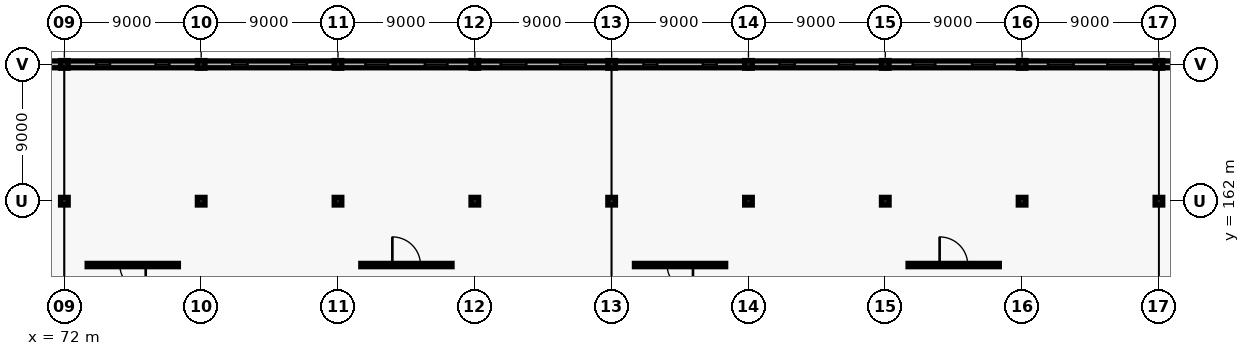
"""IFC4 building model, lengths in metres.
Left out: names, types, materials, properties, quantities, classifications, styles, units other than length and angle.
Written with IfcOpenShell. Run it as: python <this file> out.ifc"""

import sys

from ifc_helpers import new_model, si_unit, direction, frame, frame_2d, origin, origin_2d, place, context, subcontext, project, spatial, rectangle, extrude, element, fill, save


model = new_model("IFC4")
c1 = context("Model", 3, precision=1e-05, world=origin(), true_north=direction((0.0, 1.0)))
c2 = subcontext(c1, "Body", "Model", "MODEL_VIEW")
j1 = project(units=[si_unit("LENGTHUNIT", "METRE"), si_unit("PLANEANGLEUNIT", "RADIAN")], contexts=[c1])
p1 = place(None, origin())
s1 = spatial("IfcSite", under=j1, at=p1, CompositionType="ELEMENT")
p2 = place(p1, origin())
s2 = spatial("IfcBuilding", under=s1, at=p2, CompositionType="ELEMENT")
p3 = place(p2, frame((0.0, 0.0, 9.6)))
s3 = spatial("IfcBuildingStorey", under=s2, at=p3, CompositionType="ELEMENT", Elevation=9.6)
for number, where, z_axis, x_axis in (
    (1, (72.0, 162.0, 0.0), (0.0, 0.0, 1.0), (1.0, 0.0, 0.0)),
    (2, (72.0, 171.0, 0.0), (0.0, 0.0, 1.0), (1.0, 0.0, 0.0)),
    (3, (81.0, 162.0, 0.0), (0.0, 0.0, 1.0), (1.0, 0.0, 0.0)),
    (4, (81.0, 171.0, 0.0), (0.0, 0.0, 1.0), (1.0, 0.0, 0.0)),
    (5, (90.0, 162.0, 0.0), (0.0, 0.0, 1.0), (1.0, 0.0, 0.0)),
    (6, (90.0, 171.0, 0.0), (0.0, 0.0, 1.0), (1.0, 0.0, 0.0)),
    (7, (99.0, 162.0, 0.0), (0.0, 0.0, 1.0), (1.0, 0.0, 0.0)),
    (8, (99.0, 171.0, 0.0), (0.0, 0.0, 1.0), (1.0, 0.0, 0.0)),
    (9, (108.0, 162.0, 0.0), (0.0, 0.0, 1.0), (1.0, 0.0, 0.0)),
    (10, (108.0, 171.0, 0.0), (0.0, 0.0, 1.0), (1.0, 0.0, 0.0)),
    (11, (117.0, 162.0, 0.0), (0.0, 0.0, 1.0), (1.0, 0.0, 0.0)),
    (12, (117.0, 171.0, 0.0), (0.0, 0.0, 1.0), (1.0, 0.0, 0.0)),
    (13, (126.0, 162.0, 0.0), (0.0, 0.0, 1.0), (1.0, 0.0, 0.0)),
    (14, (126.0, 171.0, 0.0), (0.0, 0.0, 1.0), (1.0, 0.0, 0.0)),
    (15, (135.0, 162.0, 0.0), (0.0, 0.0, 1.0), (1.0, 0.0, 0.0)),
    (16, (135.0, 171.0, 0.0), (0.0, 0.0, 1.0), (1.0, 0.0, 0.0)),
    (17, (144.0, 162.0, 0.0), (0.0, 0.0, 1.0), (1.0, 0.0, 0.0)),
    (18, (144.0, 171.0, 0.0), (0.0, 0.0, 1.0), (1.0, 0.0, 0.0)),
):
    element("IfcColumn", number, at=place(p3, frame(where, z_axis=z_axis, x_axis=x_axis)), inside=s3, PredefinedType="COLUMN", context=c2, shape_type="SweptSolid", body=[
        extrude(rectangle(XDim=0.5, YDim=0.5, at=origin_2d()), origin(), (0.0, 0.0, 1.0), 3.9),
    ])
p4 = place(p3, frame((63.06, 171.0, 0.0), z_axis=(0.0, 0.0, 1.0), x_axis=(1.0, 0.0, 0.0)))
e19 = element("IfcWall", 19, at=p4, inside=s3, PredefinedType="SOLIDWALL", context=c2, shape_type="SweptSolid", body=[
    extrude(rectangle(XDim=8.88, YDim=0.45, at=frame_2d((4.44, 0.0))), origin(), (0.0, 0.0, 1.0), 3.15),
])
p5 = place(p4, frame((1.646, 0.0, 0.9)))
e20 = element("IfcOpeningElement", 20, at=p5, cuts=e19, PredefinedType="OPENING", context=c2, shape_type="SweptSolid", body=[
    extrude(rectangle(XDim=1.68, YDim=1.85, at=frame_2d((0.84, 0.925))), frame((0.0, 0.235, 0.0), z_axis=(0.0, -1.0, 0.0), x_axis=(1.0, 0.0, 0.0)), (0.0, 0.0, 1.0), 0.47),
])
p6 = place(p4, frame((5.554, 0.0, 0.9)))
e21 = element("IfcOpeningElement", 21, at=p6, cuts=e19, PredefinedType="OPENING", context=c2, shape_type="SweptSolid", body=[
    extrude(rectangle(XDim=1.68, YDim=1.85, at=frame_2d((0.84, 0.925))), frame((0.0, 0.235, 0.0), z_axis=(0.0, -1.0, 0.0), x_axis=(1.0, 0.0, 0.0)), (0.0, 0.0, 1.0), 0.47),
])
p7 = place(p3, frame((72.06, 171.0, 0.0), z_axis=(0.0, 0.0, 1.0), x_axis=(1.0, 0.0, 0.0)))
e22 = element("IfcWall", 22, at=p7, inside=s3, PredefinedType="SOLIDWALL", context=c2, shape_type="SweptSolid", body=[
    extrude(rectangle(XDim=8.88, YDim=0.45, at=frame_2d((4.44, 0.0))), origin(), (0.0, 0.0, 1.0), 3.15),
])
p8 = place(p7, frame((2.036, 0.0, 0.9)))
e23 = element("IfcOpeningElement", 23, at=p8, cuts=e22, PredefinedType="OPENING", context=c2, shape_type="SweptSolid", body=[
    extrude(rectangle(XDim=0.9, YDim=1.2, at=frame_2d((0.45, 0.6))), frame((0.0, 0.235, 0.0), z_axis=(0.0, -1.0, 0.0), x_axis=(1.0, 0.0, 0.0)), (0.0, 0.0, 1.0), 0.47),
])
p9 = place(p7, frame((5.944, 0.0, 0.9)))
e24 = element("IfcOpeningElement", 24, at=p9, cuts=e22, PredefinedType="OPENING", context=c2, shape_type="SweptSolid", body=[
    extrude(rectangle(XDim=0.9, YDim=1.2, at=frame_2d((0.45, 0.6))), frame((0.0, 0.235, 0.0), z_axis=(0.0, -1.0, 0.0), x_axis=(1.0, 0.0, 0.0)), (0.0, 0.0, 1.0), 0.47),
])
p10 = place(p3, frame((81.06, 171.0, 0.0), z_axis=(0.0, 0.0, 1.0), x_axis=(1.0, 0.0, 0.0)))
e25 = element("IfcWall", 25, at=p10, inside=s3, PredefinedType="SOLIDWALL", context=c2, shape_type="SweptSolid", body=[
    extrude(rectangle(XDim=8.88, YDim=0.45, at=frame_2d((4.44, 0.0))), origin(), (0.0, 0.0, 1.0), 3.15),
])
p11 = place(p10, frame((1.986, 0.0, 0.9)))
e26 = element("IfcOpeningElement", 26, at=p11, cuts=e25, PredefinedType="OPENING", context=c2, shape_type="SweptSolid", body=[
    extrude(rectangle(XDim=1.0, YDim=1.5, at=frame_2d((0.5, 0.75))), frame((0.0, 0.235, 0.0), z_axis=(0.0, -1.0, 0.0), x_axis=(1.0, 0.0, 0.0)), (0.0, 0.0, 1.0), 0.47),
])
p12 = place(p10, frame((5.894, 0.0, 0.9)))
e27 = element("IfcOpeningElement", 27, at=p12, cuts=e25, PredefinedType="OPENING", context=c2, shape_type="SweptSolid", body=[
    extrude(rectangle(XDim=1.0, YDim=1.5, at=frame_2d((0.5, 0.75))), frame((0.0, 0.235, 0.0), z_axis=(0.0, -1.0, 0.0), x_axis=(1.0, 0.0, 0.0)), (0.0, 0.0, 1.0), 0.47),
])
p13 = place(p3, frame((90.06, 171.0, 0.0), z_axis=(0.0, 0.0, 1.0), x_axis=(1.0, 0.0, 0.0)))
e28 = element("IfcWall", 28, at=p13, inside=s3, PredefinedType="SOLIDWALL", context=c2, shape_type="SweptSolid", body=[
    extrude(rectangle(XDim=8.88, YDim=0.45, at=frame_2d((4.44, 0.0))), origin(), (0.0, 0.0, 1.0), 3.15),
])
p14 = place(p13, frame((1.746, 0.0, 0.9)))
e29 = element("IfcOpeningElement", 29, at=p14, cuts=e28, PredefinedType="OPENING", context=c2, shape_type="SweptSolid", body=[
    extrude(rectangle(XDim=1.48, YDim=1.75, at=frame_2d((0.74, 0.875))), frame((0.0, 0.235, 0.0), z_axis=(0.0, -1.0, 0.0), x_axis=(1.0, 0.0, 0.0)), (0.0, 0.0, 1.0), 0.47),
])
p15 = place(p13, frame((5.654, 0.0, 0.9)))
e30 = element("IfcOpeningElement", 30, at=p15, cuts=e28, PredefinedType="OPENING", context=c2, shape_type="SweptSolid", body=[
    extrude(rectangle(XDim=1.48, YDim=1.75, at=frame_2d((0.74, 0.875))), frame((0.0, 0.235, 0.0), z_axis=(0.0, -1.0, 0.0), x_axis=(1.0, 0.0, 0.0)), (0.0, 0.0, 1.0), 0.47),
])
p16 = place(p3, frame((99.06, 171.0, 0.0), z_axis=(0.0, 0.0, 1.0), x_axis=(1.0, 0.0, 0.0)))
e31 = element("IfcWall", 31, at=p16, inside=s3, PredefinedType="SOLIDWALL", context=c2, shape_type="SweptSolid", body=[
    extrude(rectangle(XDim=8.88, YDim=0.45, at=frame_2d((4.44, 0.0))), origin(), (0.0, 0.0, 1.0), 3.15),
])
p17 = place(p16, frame((1.646, 0.0, 0.9)))
e32 = element("IfcOpeningElement", 32, at=p17, cuts=e31, PredefinedType="OPENING", context=c2, shape_type="SweptSolid", body=[
    extrude(rectangle(XDim=1.68, YDim=1.85, at=frame_2d((0.84, 0.925))), frame((0.0, 0.235, 0.0), z_axis=(0.0, -1.0, 0.0), x_axis=(1.0, 0.0, 0.0)), (0.0, 0.0, 1.0), 0.47),
])
p18 = place(p16, frame((5.554, 0.0, 0.9)))
e33 = element("IfcOpeningElement", 33, at=p18, cuts=e31, PredefinedType="OPENING", context=c2, shape_type="SweptSolid", body=[
    extrude(rectangle(XDim=1.68, YDim=1.85, at=frame_2d((0.84, 0.925))), frame((0.0, 0.235, 0.0), z_axis=(0.0, -1.0, 0.0), x_axis=(1.0, 0.0, 0.0)), (0.0, 0.0, 1.0), 0.47),
])
p19 = place(p3, frame((108.06, 171.0, 0.0), z_axis=(0.0, 0.0, 1.0), x_axis=(1.0, 0.0, 0.0)))
e34 = element("IfcWall", 34, at=p19, inside=s3, PredefinedType="SOLIDWALL", context=c2, shape_type="SweptSolid", body=[
    extrude(rectangle(XDim=8.88, YDim=0.45, at=frame_2d((4.44, 0.0))), origin(), (0.0, 0.0, 1.0), 3.15),
])
p20 = place(p19, frame((2.036, 0.0, 0.9)))
e35 = element("IfcOpeningElement", 35, at=p20, cuts=e34, PredefinedType="OPENING", context=c2, shape_type="SweptSolid", body=[
    extrude(rectangle(XDim=0.9, YDim=1.2, at=frame_2d((0.45, 0.6))), frame((0.0, 0.235, 0.0), z_axis=(0.0, -1.0, 0.0), x_axis=(1.0, 0.0, 0.0)), (0.0, 0.0, 1.0), 0.47),
])
p21 = place(p19, frame((5.944, 0.0, 0.9)))
e36 = element("IfcOpeningElement", 36, at=p21, cuts=e34, PredefinedType="OPENING", context=c2, shape_type="SweptSolid", body=[
    extrude(rectangle(XDim=0.9, YDim=1.2, at=frame_2d((0.45, 0.6))), frame((0.0, 0.235, 0.0), z_axis=(0.0, -1.0, 0.0), x_axis=(1.0, 0.0, 0.0)), (0.0, 0.0, 1.0), 0.47),
])
p22 = place(p3, frame((117.06, 171.0, 0.0), z_axis=(0.0, 0.0, 1.0), x_axis=(1.0, 0.0, 0.0)))
e37 = element("IfcWall", 37, at=p22, inside=s3, PredefinedType="SOLIDWALL", context=c2, shape_type="SweptSolid", body=[
    extrude(rectangle(XDim=8.88, YDim=0.45, at=frame_2d((4.44, 0.0))), origin(), (0.0, 0.0, 1.0), 3.15),
])
p23 = place(p22, frame((1.986, 0.0, 0.9)))
e38 = element("IfcOpeningElement", 38, at=p23, cuts=e37, PredefinedType="OPENING", context=c2, shape_type="SweptSolid", body=[
    extrude(rectangle(XDim=1.0, YDim=1.5, at=frame_2d((0.5, 0.75))), frame((0.0, 0.235, 0.0), z_axis=(0.0, -1.0, 0.0), x_axis=(1.0, 0.0, 0.0)), (0.0, 0.0, 1.0), 0.47),
])
p24 = place(p22, frame((5.894, 0.0, 0.9)))
e39 = element("IfcOpeningElement", 39, at=p24, cuts=e37, PredefinedType="OPENING", context=c2, shape_type="SweptSolid", body=[
    extrude(rectangle(XDim=1.0, YDim=1.5, at=frame_2d((0.5, 0.75))), frame((0.0, 0.235, 0.0), z_axis=(0.0, -1.0, 0.0), x_axis=(1.0, 0.0, 0.0)), (0.0, 0.0, 1.0), 0.47),
])
p25 = place(p3, frame((126.06, 171.0, 0.0), z_axis=(0.0, 0.0, 1.0), x_axis=(1.0, 0.0, 0.0)))
e40 = element("IfcWall", 40, at=p25, inside=s3, PredefinedType="SOLIDWALL", context=c2, shape_type="SweptSolid", body=[
    extrude(rectangle(XDim=8.88, YDim=0.45, at=frame_2d((4.44, 0.0))), origin(), (0.0, 0.0, 1.0), 3.15),
])
p26 = place(p25, frame((1.746, 0.0, 0.9)))
e41 = element("IfcOpeningElement", 41, at=p26, cuts=e40, PredefinedType="OPENING", context=c2, shape_type="SweptSolid", body=[
    extrude(rectangle(XDim=1.48, YDim=1.75, at=frame_2d((0.74, 0.875))), frame((0.0, 0.235, 0.0), z_axis=(0.0, -1.0, 0.0), x_axis=(1.0, 0.0, 0.0)), (0.0, 0.0, 1.0), 0.47),
])
p27 = place(p25, frame((5.654, 0.0, 0.9)))
e42 = element("IfcOpeningElement", 42, at=p27, cuts=e40, PredefinedType="OPENING", context=c2, shape_type="SweptSolid", body=[
    extrude(rectangle(XDim=1.48, YDim=1.75, at=frame_2d((0.74, 0.875))), frame((0.0, 0.235, 0.0), z_axis=(0.0, -1.0, 0.0), x_axis=(1.0, 0.0, 0.0)), (0.0, 0.0, 1.0), 0.47),
])
p28 = place(p3, frame((135.06, 171.0, 0.0), z_axis=(0.0, 0.0, 1.0), x_axis=(1.0, 0.0, 0.0)))
e43 = element("IfcWall", 43, at=p28, inside=s3, PredefinedType="SOLIDWALL", context=c2, shape_type="SweptSolid", body=[
    extrude(rectangle(XDim=8.88, YDim=0.45, at=frame_2d((4.44, 0.0))), origin(), (0.0, 0.0, 1.0), 3.15),
])
p29 = place(p28, frame((1.646, 0.0, 0.9)))
e44 = element("IfcOpeningElement", 44, at=p29, cuts=e43, PredefinedType="OPENING", context=c2, shape_type="SweptSolid", body=[
    extrude(rectangle(XDim=1.68, YDim=1.85, at=frame_2d((0.84, 0.925))), frame((0.0, 0.235, 0.0), z_axis=(0.0, -1.0, 0.0), x_axis=(1.0, 0.0, 0.0)), (0.0, 0.0, 1.0), 0.47),
])
p30 = place(p28, frame((5.554, 0.0, 0.9)))
e45 = element("IfcOpeningElement", 45, at=p30, cuts=e43, PredefinedType="OPENING", context=c2, shape_type="SweptSolid", body=[
    extrude(rectangle(XDim=1.68, YDim=1.85, at=frame_2d((0.84, 0.925))), frame((0.0, 0.235, 0.0), z_axis=(0.0, -1.0, 0.0), x_axis=(1.0, 0.0, 0.0)), (0.0, 0.0, 1.0), 0.47),
])
p31 = place(p3, frame((144.06, 171.0, 0.0), z_axis=(0.0, 0.0, 1.0), x_axis=(1.0, 0.0, 0.0)))
e46 = element("IfcWall", 46, at=p31, inside=s3, PredefinedType="SOLIDWALL", context=c2, shape_type="SweptSolid", body=[
    extrude(rectangle(XDim=8.88, YDim=0.45, at=frame_2d((4.44, 0.0))), origin(), (0.0, 0.0, 1.0), 3.15),
])
p32 = place(p31, frame((2.036, 0.0, 0.9)))
e47 = element("IfcOpeningElement", 47, at=p32, cuts=e46, PredefinedType="OPENING", context=c2, shape_type="SweptSolid", body=[
    extrude(rectangle(XDim=0.9, YDim=1.2, at=frame_2d((0.45, 0.6))), frame((0.0, 0.235, 0.0), z_axis=(0.0, -1.0, 0.0), x_axis=(1.0, 0.0, 0.0)), (0.0, 0.0, 1.0), 0.47),
])
p33 = place(p31, frame((5.944, 0.0, 0.9)))
e48 = element("IfcOpeningElement", 48, at=p33, cuts=e46, PredefinedType="OPENING", context=c2, shape_type="SweptSolid", body=[
    extrude(rectangle(XDim=0.9, YDim=1.2, at=frame_2d((0.45, 0.6))), frame((0.0, 0.235, 0.0), z_axis=(0.0, -1.0, 0.0), x_axis=(1.0, 0.0, 0.0)), (0.0, 0.0, 1.0), 0.47),
])
p34 = place(p3, frame((73.5, 157.8, 0.0), z_axis=(0.0, 0.0, 1.0), x_axis=(1.0, 0.0, 0.0)))
e49 = element("IfcWall", 49, at=p34, inside=s3, PredefinedType="PARTITIONING", context=c2, shape_type="SweptSolid", body=[
    extrude(rectangle(XDim=6.0, YDim=0.215, at=frame_2d((3.0, 0.0))), origin(), (0.0, 0.0, 1.0), 2.9),
])
p35 = place(p34, frame((2.15, 0.0, 0.0)))
e50 = element("IfcOpeningElement", 50, at=p35, cuts=e49, PredefinedType="OPENING", context=c2, shape_type="SweptSolid", body=[
    extrude(rectangle(XDim=1.7, YDim=2.35, at=frame_2d((0.85, 1.175))), frame((0.0, 0.117, 0.0), z_axis=(0.0, -1.0, 0.0), x_axis=(1.0, 0.0, 0.0)), (0.0, 0.0, 1.0), 0.235),
])
p36 = place(p3, frame((91.5, 157.8, 0.0), z_axis=(0.0, 0.0, 1.0), x_axis=(1.0, 0.0, 0.0)))
e51 = element("IfcWall", 51, at=p36, inside=s3, PredefinedType="PARTITIONING", context=c2, shape_type="SweptSolid", body=[
    extrude(rectangle(XDim=6.0, YDim=0.215, at=frame_2d((3.0, 0.0))), origin(), (0.0, 0.0, 1.0), 2.9),
])
p37 = place(p36, frame((2.075, 0.0, 0.0)))
e52 = element("IfcOpeningElement", 52, at=p37, cuts=e51, PredefinedType="OPENING", context=c2, shape_type="SweptSolid", body=[
    extrude(rectangle(XDim=1.85, YDim=2.35, at=frame_2d((0.925, 1.175))), frame((0.0, 0.117, 0.0), z_axis=(0.0, -1.0, 0.0), x_axis=(1.0, 0.0, 0.0)), (0.0, 0.0, 1.0), 0.235),
])
p38 = place(p3, frame((109.5, 157.8, 0.0), z_axis=(0.0, 0.0, 1.0), x_axis=(1.0, 0.0, 0.0)))
e53 = element("IfcWall", 53, at=p38, inside=s3, PredefinedType="PARTITIONING", context=c2, shape_type="SweptSolid", body=[
    extrude(rectangle(XDim=6.0, YDim=0.215, at=frame_2d((3.0, 0.0))), origin(), (0.0, 0.0, 1.0), 2.9),
])
p39 = place(p38, frame((2.15, 0.0, 0.0)))
e54 = element("IfcOpeningElement", 54, at=p39, cuts=e53, PredefinedType="OPENING", context=c2, shape_type="SweptSolid", body=[
    extrude(rectangle(XDim=1.7, YDim=2.35, at=frame_2d((0.85, 1.175))), frame((0.0, 0.117, 0.0), z_axis=(0.0, -1.0, 0.0), x_axis=(1.0, 0.0, 0.0)), (0.0, 0.0, 1.0), 0.235),
])
p40 = place(p3, frame((127.5, 157.8, 0.0), z_axis=(0.0, 0.0, 1.0), x_axis=(1.0, 0.0, 0.0)))
e55 = element("IfcWall", 55, at=p40, inside=s3, PredefinedType="PARTITIONING", context=c2, shape_type="SweptSolid", body=[
    extrude(rectangle(XDim=6.0, YDim=0.215, at=frame_2d((3.0, 0.0))), origin(), (0.0, 0.0, 1.0), 2.9),
])
p41 = place(p40, frame((2.075, 0.0, 0.0)))
e56 = element("IfcOpeningElement", 56, at=p41, cuts=e55, PredefinedType="OPENING", context=c2, shape_type="SweptSolid", body=[
    extrude(rectangle(XDim=1.85, YDim=2.35, at=frame_2d((0.925, 1.175))), frame((0.0, 0.117, 0.0), z_axis=(0.0, -1.0, 0.0), x_axis=(1.0, 0.0, 0.0)), (0.0, 0.0, 1.0), 0.235),
])
p42 = place(p8, origin())
e57 = element("IfcWindow", 57, at=p42, inside=s3, PartitioningType="SINGLE_PANEL", PredefinedType="WINDOW", context=c2, shape_type="SweptSolid", body=[
    extrude(rectangle(XDim=0.9, YDim=1.2, at=frame_2d((0.45, 0.6))), frame((0.0, 0.03, 0.0), z_axis=(0.0, -1.0, 0.0), x_axis=(1.0, 0.0, 0.0)), (0.0, 0.0, 1.0), 0.06),
])
fill(e23, e57)
p43 = place(p9, origin())
e58 = element("IfcWindow", 58, at=p43, inside=s3, PartitioningType="SINGLE_PANEL", PredefinedType="WINDOW", context=c2, shape_type="SweptSolid", body=[
    extrude(rectangle(XDim=0.9, YDim=1.2, at=frame_2d((0.45, 0.6))), frame((0.0, 0.03, 0.0), z_axis=(0.0, -1.0, 0.0), x_axis=(1.0, 0.0, 0.0)), (0.0, 0.0, 1.0), 0.06),
])
fill(e24, e58)
p44 = place(p11, origin())
e59 = element("IfcWindow", 59, at=p44, inside=s3, PartitioningType="SINGLE_PANEL", PredefinedType="WINDOW", context=c2, shape_type="SweptSolid", body=[
    extrude(rectangle(XDim=1.0, YDim=1.5, at=frame_2d((0.5, 0.75))), frame((0.0, 0.03, 0.0), z_axis=(0.0, -1.0, 0.0), x_axis=(1.0, 0.0, 0.0)), (0.0, 0.0, 1.0), 0.06),
])
fill(e26, e59)
p45 = place(p12, origin())
e60 = element("IfcWindow", 60, at=p45, inside=s3, PartitioningType="SINGLE_PANEL", PredefinedType="WINDOW", context=c2, shape_type="SweptSolid", body=[
    extrude(rectangle(XDim=1.0, YDim=1.5, at=frame_2d((0.5, 0.75))), frame((0.0, 0.03, 0.0), z_axis=(0.0, -1.0, 0.0), x_axis=(1.0, 0.0, 0.0)), (0.0, 0.0, 1.0), 0.06),
])
fill(e27, e60)
p46 = place(p14, origin())
e61 = element("IfcWindow", 61, at=p46, inside=s3, PartitioningType="SINGLE_PANEL", PredefinedType="WINDOW", context=c2, shape_type="SweptSolid", body=[
    extrude(rectangle(XDim=1.48, YDim=1.75, at=frame_2d((0.74, 0.875))), frame((0.0, 0.03, 0.0), z_axis=(0.0, -1.0, 0.0), x_axis=(1.0, 0.0, 0.0)), (0.0, 0.0, 1.0), 0.06),
])
fill(e29, e61)
p47 = place(p15, origin())
e62 = element("IfcWindow", 62, at=p47, inside=s3, PartitioningType="SINGLE_PANEL", PredefinedType="WINDOW", context=c2, shape_type="SweptSolid", body=[
    extrude(rectangle(XDim=1.48, YDim=1.75, at=frame_2d((0.74, 0.875))), frame((0.0, 0.03, 0.0), z_axis=(0.0, -1.0, 0.0), x_axis=(1.0, 0.0, 0.0)), (0.0, 0.0, 1.0), 0.06),
])
fill(e30, e62)
p48 = place(p17, origin())
e63 = element("IfcWindow", 63, at=p48, inside=s3, PartitioningType="SINGLE_PANEL", PredefinedType="WINDOW", context=c2, shape_type="SweptSolid", body=[
    extrude(rectangle(XDim=1.68, YDim=1.85, at=frame_2d((0.84, 0.925))), frame((0.0, 0.03, 0.0), z_axis=(0.0, -1.0, 0.0), x_axis=(1.0, 0.0, 0.0)), (0.0, 0.0, 1.0), 0.06),
])
fill(e32, e63)
p49 = place(p18, origin())
e64 = element("IfcWindow", 64, at=p49, inside=s3, PartitioningType="SINGLE_PANEL", PredefinedType="WINDOW", context=c2, shape_type="SweptSolid", body=[
    extrude(rectangle(XDim=1.68, YDim=1.85, at=frame_2d((0.84, 0.925))), frame((0.0, 0.03, 0.0), z_axis=(0.0, -1.0, 0.0), x_axis=(1.0, 0.0, 0.0)), (0.0, 0.0, 1.0), 0.06),
])
fill(e33, e64)
p50 = place(p20, origin())
e65 = element("IfcWindow", 65, at=p50, inside=s3, PartitioningType="SINGLE_PANEL", PredefinedType="WINDOW", context=c2, shape_type="SweptSolid", body=[
    extrude(rectangle(XDim=0.9, YDim=1.2, at=frame_2d((0.45, 0.6))), frame((0.0, 0.03, 0.0), z_axis=(0.0, -1.0, 0.0), x_axis=(1.0, 0.0, 0.0)), (0.0, 0.0, 1.0), 0.06),
])
fill(e35, e65)
p51 = place(p21, origin())
e66 = element("IfcWindow", 66, at=p51, inside=s3, PartitioningType="SINGLE_PANEL", PredefinedType="WINDOW", context=c2, shape_type="SweptSolid", body=[
    extrude(rectangle(XDim=0.9, YDim=1.2, at=frame_2d((0.45, 0.6))), frame((0.0, 0.03, 0.0), z_axis=(0.0, -1.0, 0.0), x_axis=(1.0, 0.0, 0.0)), (0.0, 0.0, 1.0), 0.06),
])
fill(e36, e66)
p52 = place(p23, origin())
e67 = element("IfcWindow", 67, at=p52, inside=s3, PartitioningType="SINGLE_PANEL", PredefinedType="WINDOW", context=c2, shape_type="SweptSolid", body=[
    extrude(rectangle(XDim=1.0, YDim=1.5, at=frame_2d((0.5, 0.75))), frame((0.0, 0.03, 0.0), z_axis=(0.0, -1.0, 0.0), x_axis=(1.0, 0.0, 0.0)), (0.0, 0.0, 1.0), 0.06),
])
fill(e38, e67)
p53 = place(p24, origin())
e68 = element("IfcWindow", 68, at=p53, inside=s3, PartitioningType="SINGLE_PANEL", PredefinedType="WINDOW", context=c2, shape_type="SweptSolid", body=[
    extrude(rectangle(XDim=1.0, YDim=1.5, at=frame_2d((0.5, 0.75))), frame((0.0, 0.03, 0.0), z_axis=(0.0, -1.0, 0.0), x_axis=(1.0, 0.0, 0.0)), (0.0, 0.0, 1.0), 0.06),
])
fill(e39, e68)
p54 = place(p26, origin())
e69 = element("IfcWindow", 69, at=p54, inside=s3, PartitioningType="SINGLE_PANEL", PredefinedType="WINDOW", context=c2, shape_type="SweptSolid", body=[
    extrude(rectangle(XDim=1.48, YDim=1.75, at=frame_2d((0.74, 0.875))), frame((0.0, 0.03, 0.0), z_axis=(0.0, -1.0, 0.0), x_axis=(1.0, 0.0, 0.0)), (0.0, 0.0, 1.0), 0.06),
])
fill(e41, e69)
p55 = place(p27, origin())
e70 = element("IfcWindow", 70, at=p55, inside=s3, PartitioningType="SINGLE_PANEL", PredefinedType="WINDOW", context=c2, shape_type="SweptSolid", body=[
    extrude(rectangle(XDim=1.48, YDim=1.75, at=frame_2d((0.74, 0.875))), frame((0.0, 0.03, 0.0), z_axis=(0.0, -1.0, 0.0), x_axis=(1.0, 0.0, 0.0)), (0.0, 0.0, 1.0), 0.06),
])
fill(e42, e70)
p56 = place(p29, origin())
e71 = element("IfcWindow", 71, at=p56, inside=s3, PartitioningType="SINGLE_PANEL", PredefinedType="WINDOW", context=c2, shape_type="SweptSolid", body=[
    extrude(rectangle(XDim=1.68, YDim=1.85, at=frame_2d((0.84, 0.925))), frame((0.0, 0.03, 0.0), z_axis=(0.0, -1.0, 0.0), x_axis=(1.0, 0.0, 0.0)), (0.0, 0.0, 1.0), 0.06),
])
fill(e44, e71)
p57 = place(p30, origin())
e72 = element("IfcWindow", 72, at=p57, inside=s3, PartitioningType="SINGLE_PANEL", PredefinedType="WINDOW", context=c2, shape_type="SweptSolid", body=[
    extrude(rectangle(XDim=1.68, YDim=1.85, at=frame_2d((0.84, 0.925))), frame((0.0, 0.03, 0.0), z_axis=(0.0, -1.0, 0.0), x_axis=(1.0, 0.0, 0.0)), (0.0, 0.0, 1.0), 0.06),
])
fill(e45, e72)
p58 = place(p35, origin())
e73 = element("IfcDoor", 73, at=p58, inside=s3, OperationType="SINGLE_SWING_RIGHT", PredefinedType="DOOR", context=c2, shape_type="SweptSolid", body=[
    extrude(rectangle(XDim=1.7, YDim=2.35, at=frame_2d((0.85, 1.175))), frame((0.0, 0.025, 0.0), z_axis=(0.0, -1.0, 0.0), x_axis=(1.0, 0.0, 0.0)), (0.0, 0.0, 1.0), 0.05),
])
fill(e50, e73)
p59 = place(p37, origin())
e74 = element("IfcDoor", 74, at=p59, inside=s3, OperationType="SINGLE_SWING_LEFT", PredefinedType="DOOR", context=c2, shape_type="SweptSolid", body=[
    extrude(rectangle(XDim=1.85, YDim=2.35, at=frame_2d((0.925, 1.175))), frame((0.0, 0.025, 0.0), z_axis=(0.0, -1.0, 0.0), x_axis=(1.0, 0.0, 0.0)), (0.0, 0.0, 1.0), 0.05),
])
fill(e52, e74)
p60 = place(p39, origin())
e75 = element("IfcDoor", 75, at=p60, inside=s3, OperationType="SINGLE_SWING_RIGHT", PredefinedType="DOOR", context=c2, shape_type="SweptSolid", body=[
    extrude(rectangle(XDim=1.7, YDim=2.35, at=frame_2d((0.85, 1.175))), frame((0.0, 0.025, 0.0), z_axis=(0.0, -1.0, 0.0), x_axis=(1.0, 0.0, 0.0)), (0.0, 0.0, 1.0), 0.05),
])
fill(e54, e75)
p61 = place(p41, origin())
e76 = element("IfcDoor", 76, at=p61, inside=s3, OperationType="SINGLE_SWING_LEFT", PredefinedType="DOOR", context=c2, shape_type="SweptSolid", body=[
    extrude(rectangle(XDim=1.85, YDim=2.35, at=frame_2d((0.925, 1.175))), frame((0.0, 0.025, 0.0), z_axis=(0.0, -1.0, 0.0), x_axis=(1.0, 0.0, 0.0)), (0.0, 0.0, 1.0), 0.05),
])
fill(e56, e76)
save(model, sys.argv[1])
